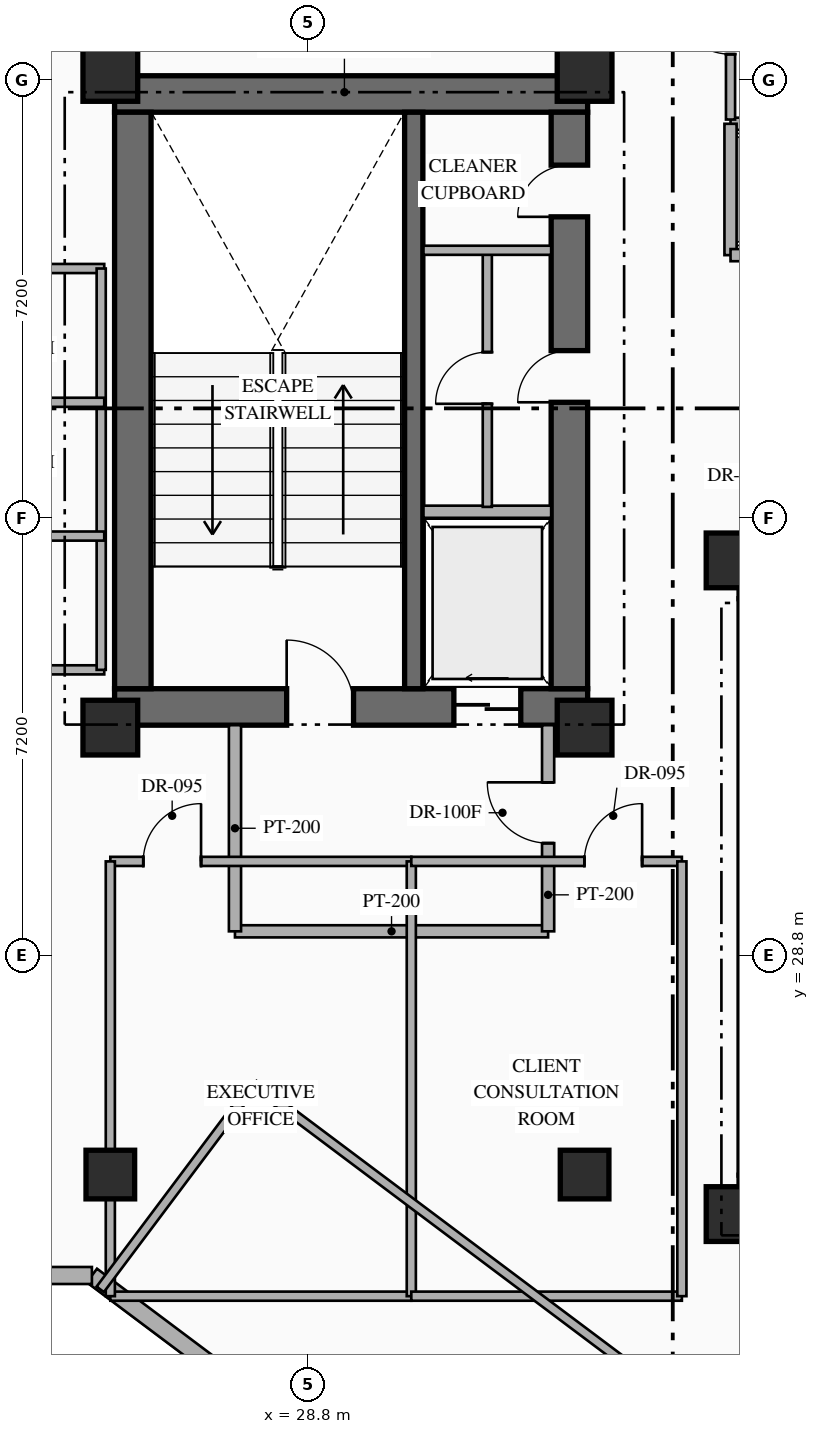
"""IFC4 building model, lengths in metres.
Left out: names, types, materials, properties, quantities, classifications, styles, units other than length and angle.
Written with IfcOpenShell. Run it as: python <this file> out.ifc"""

import sys

from ifc_helpers import new_model, si_unit, direction, frame, frame_2d, origin, origin_2d, place, context, subcontext, project, spatial, rectangle, hollow_rectangle, extrude, element, fill, save


model = new_model("IFC4")
c1 = context("Model", 3, precision=1e-05, world=origin(), true_north=direction((0.0, 1.0)))
c2 = subcontext(c1, "Body", "Model", "MODEL_VIEW")
j1 = project(units=[si_unit("LENGTHUNIT", "METRE"), si_unit("PLANEANGLEUNIT", "RADIAN")], contexts=[c1])
p1 = place(None, origin())
s1 = spatial("IfcSite", under=j1, at=p1, CompositionType="ELEMENT")
p2 = place(p1, origin())
s2 = spatial("IfcBuilding", under=s1, at=p2, CompositionType="ELEMENT")
p3 = place(p2, frame((0.0, 0.0, 163.65)))
s3 = spatial("IfcBuildingStorey", under=s2, at=p3, CompositionType="ELEMENT", Elevation=163.65)
p4 = place(p3, frame((25.62, 32.89, 0.0), z_axis=(0.0, 0.0, 1.0), x_axis=(1.0, 0.0, 0.0)))
e1 = element("IfcWall", 1, at=p4, inside=s3, PredefinedType="SHEAR", context=c2, shape_type="SweptSolid", body=[
    extrude(rectangle(XDim=7.78, YDim=0.6, at=frame_2d((3.89, 0.0))), origin(), (0.0, 0.0, 1.0), 3.6),
])
p5 = place(p4, frame((2.83, 0.0, 0.0)))
e2 = element("IfcOpeningElement", 2, at=p5, cuts=e1, PredefinedType="OPENING", context=c2, shape_type="SweptSolid", body=[
    extrude(rectangle(XDim=1.1, YDim=2.2, at=frame_2d((0.55, 1.1))), frame((0.0, 0.31, 0.0), z_axis=(0.0, -1.0, 0.0), x_axis=(1.0, 0.0, 0.0)), (0.0, 0.0, 1.0), 0.62),
])
p6 = place(p4, frame((5.58, 0.0, 0.0)))
e3 = element("IfcOpeningElement", 3, at=p6, cuts=e1, PredefinedType="OPENING", context=c2, shape_type="SweptSolid", body=[
    extrude(rectangle(XDim=1.1, YDim=2.15, at=frame_2d((0.55, 1.075))), frame((0.0, 0.31, 0.0), z_axis=(0.0, -1.0, 0.0), x_axis=(1.0, 0.0, 0.0)), (0.0, 0.0, 1.0), 0.62),
])
p7 = place(p3, frame((25.62, 42.97, 0.0), z_axis=(0.0, 0.0, 1.0), x_axis=(1.0, 0.0, 0.0)))
e4 = element("IfcWall", 4, at=p7, inside=s3, PredefinedType="SHEAR", context=c2, shape_type="SweptSolid", body=[
    extrude(rectangle(XDim=7.78, YDim=0.6, at=frame_2d((3.89, 0.0))), origin(), (0.0, 0.0, 1.0), 3.6),
])
p8 = place(p3, frame((25.92, 33.19, 0.0), z_axis=(0.0, 0.0, 1.0), x_axis=(0.0, 1.0, 0.0)))
e5 = element("IfcWall", 5, at=p8, inside=s3, PredefinedType="SHEAR", context=c2, shape_type="SweptSolid", body=[
    extrude(rectangle(XDim=9.48, YDim=0.6, at=frame_2d((4.74, 0.0))), origin(), (0.0, 0.0, 1.0), 3.6),
])
p9 = place(p3, frame((33.1, 33.19, 0.0), z_axis=(0.0, 0.0, 1.0), x_axis=(0.0, 1.0, 0.0)))
e6 = element("IfcWall", 6, at=p9, inside=s3, PredefinedType="SHEAR", context=c2, shape_type="SweptSolid", body=[
    extrude(rectangle(XDim=9.48, YDim=0.6, at=frame_2d((4.74, 0.0))), origin(), (0.0, 0.0, 1.0), 3.6),
])
p10 = place(p9, frame((4.71, 0.0, 0.0)))
e7 = element("IfcOpeningElement", 7, at=p10, cuts=e6, PredefinedType="OPENING", context=c2, shape_type="SweptSolid", body=[
    extrude(rectangle(XDim=0.85, YDim=2.08, at=frame_2d((0.425, 1.04))), frame((0.0, 0.31, 0.0), z_axis=(0.0, -1.0, 0.0), x_axis=(1.0, 0.0, 0.0)), (0.0, 0.0, 1.0), 0.62),
])
p11 = place(p9, frame((7.76, 0.0, 0.0)))
e8 = element("IfcOpeningElement", 8, at=p11, cuts=e6, PredefinedType="OPENING", context=c2, shape_type="SweptSolid", body=[
    extrude(rectangle(XDim=0.85, YDim=2.08, at=frame_2d((0.425, 1.04))), frame((0.0, 0.31, 0.0), z_axis=(0.0, -1.0, 0.0), x_axis=(1.0, 0.0, 0.0)), (0.0, 0.0, 1.0), 0.62),
])
p12 = place(p3, frame((30.54, 33.19, 0.0), z_axis=(0.0, 0.0, 1.0), x_axis=(0.0, 1.0, 0.0)))
e9 = element("IfcWall", 9, at=p12, inside=s3, PredefinedType="SHEAR", context=c2, shape_type="SweptSolid", body=[
    extrude(rectangle(XDim=9.48, YDim=0.3, at=frame_2d((4.74, 0.0))), origin(), (0.0, 0.0, 1.0), 3.6),
])
p13 = place(p3, frame((35.89, 24.89, 0.0), z_axis=(0.0, 0.0, 1.0), x_axis=(1.0, 0.0, 0.0)))
e10 = element("IfcWall", 10, at=p13, inside=s3, PredefinedType="SHEAR", context=c2, shape_type="SweptSolid", body=[
    extrude(rectangle(XDim=7.76, YDim=0.6, at=frame_2d((3.88, 0.0))), origin(), (0.0, 0.0, 1.0), 3.6),
])
p14 = place(p3, frame((35.89, 34.97, 0.0), z_axis=(0.0, 0.0, 1.0), x_axis=(1.0, 0.0, 0.0)))
e11 = element("IfcWall", 11, at=p14, inside=s3, PredefinedType="SHEAR", context=c2, shape_type="SweptSolid", body=[
    extrude(rectangle(XDim=7.76, YDim=0.6, at=frame_2d((3.88, 0.0))), origin(), (0.0, 0.0, 1.0), 3.6),
])
p15 = place(p14, frame((2.66, 0.0, 0.0)))
e12 = element("IfcOpeningElement", 12, at=p15, cuts=e11, PredefinedType="OPENING", context=c2, shape_type="SweptSolid", body=[
    extrude(rectangle(XDim=1.1, YDim=2.2, at=frame_2d((0.55, 1.1))), frame((0.0, 0.31, 0.0), z_axis=(0.0, -1.0, 0.0), x_axis=(1.0, 0.0, 0.0)), (0.0, 0.0, 1.0), 0.62),
])
p16 = place(p14, frame((5.56, 0.0, 0.0)))
e13 = element("IfcOpeningElement", 13, at=p16, cuts=e11, PredefinedType="OPENING", context=c2, shape_type="SweptSolid", body=[
    extrude(rectangle(XDim=1.12, YDim=2.15, at=frame_2d((0.56, 1.075))), frame((0.0, 0.31, 0.0), z_axis=(0.0, -1.0, 0.0), x_axis=(1.0, 0.0, 0.0)), (0.0, 0.0, 1.0), 0.62),
])
p17 = place(p3, frame((36.19, 25.19, 0.0), z_axis=(0.0, 0.0, 1.0), x_axis=(0.0, 1.0, 0.0)))
e14 = element("IfcWall", 14, at=p17, inside=s3, PredefinedType="SHEAR", context=c2, shape_type="SweptSolid", body=[
    extrude(rectangle(XDim=9.48, YDim=0.6, at=frame_2d((4.74, 0.0))), origin(), (0.0, 0.0, 1.0), 3.6),
])
for number, where, z_axis, x_axis in (
    (15, (25.55, 32.55, 0.0), (0.0, 0.0, 1.0), (1.0, 0.0, 0.0)),
    (16, (33.35, 32.55, 0.0), (0.0, 0.0, 1.0), (1.0, 0.0, 0.0)),
    (17, (25.55, 43.3, 0.0), (0.0, 0.0, 1.0), (1.0, 0.0, 0.0)),
    (18, (33.35, 43.3, 0.0), (0.0, 0.0, 1.0), (1.0, 0.0, 0.0)),
    (19, (35.8, 24.55, 0.0), (0.0, 0.0, 1.0), (1.0, 0.0, 0.0)),
    (20, (35.8, 35.3, 0.0), (0.0, 0.0, 1.0), (1.0, 0.0, 0.0)),
):
    element("IfcColumn", number, at=place(p3, frame(where, z_axis=z_axis, x_axis=x_axis)), inside=s3, PredefinedType="COLUMN", context=c2, shape_type="SweptSolid", body=[
        extrude(rectangle(XDim=0.9, YDim=0.9, at=origin_2d()), origin(), (0.0, 0.0, 1.0), 3.6),
    ])
for number, where, z_axis, x_axis in (
    (21, (25.55, 25.2, 0.0), (0.0, 0.0, 1.0), (1.0, 0.0, 0.0)),
    (22, (33.35, 25.2, 0.0), (0.0, 0.0, 1.0), (1.0, 0.0, 0.0)),
):
    element("IfcColumn", number, at=place(p3, frame(where, z_axis=z_axis, x_axis=x_axis)), inside=s3, PredefinedType="COLUMN", context=c2, shape_type="SweptSolid", body=[
        extrude(hollow_rectangle(XDim=0.8, YDim=0.8, WallThickness=0.032, at=origin_2d()), origin(), (0.0, 0.0, 1.0), 3.6),
    ])
p18 = place(p3, frame((44.918, 8.787, 0.0), z_axis=(0.0, 0.0, 1.0), x_axis=(-0.800004765927, 0.599993645378, 0.0)))
e23 = element("IfcWall", 23, at=p18, inside=s3, PredefinedType="STANDARD", context=c2, shape_type="SweptSolid", body=[
    extrude(rectangle(XDim=24.588, YDim=0.28, at=frame_2d((12.294, 0.0))), origin(), (0.0, 0.0, 1.0), 3.35),
])
p19 = place(p3, frame((25.247, 23.54, 0.0), z_axis=(0.0, 0.0, 1.0), x_axis=(-1.0, 0.0, 0.0)))
e24 = element("IfcWall", 24, at=p19, inside=s3, PredefinedType="STANDARD", context=c2, shape_type="SweptSolid", body=[
    extrude(rectangle(XDim=6.747, YDim=0.28, at=frame_2d((3.374, 0.0))), origin(), (0.0, 0.0, 1.0), 3.35),
])
p20 = place(p3, frame((30.7, 36.1, 0.0), z_axis=(0.0, 0.0, 1.0), x_axis=(1.0, 0.0, 0.0)))
e25 = element("IfcWall", 25, at=p20, inside=s3, PredefinedType="STANDARD", context=c2, shape_type="SweptSolid", body=[
    extrude(rectangle(XDim=2.1, YDim=0.2, at=frame_2d((1.05, 0.0))), origin(), (0.0, 0.0, 1.0), 3.35),
])
p21 = place(p3, frame((31.75, 36.18, 0.0), z_axis=(0.0, 0.0, 1.0), x_axis=(0.0, 1.0, 0.0)))
e26 = element("IfcWall", 26, at=p21, inside=s3, PredefinedType="PARTITIONING", context=c2, shape_type="SweptSolid", body=[
    extrude(rectangle(XDim=4.24, YDim=0.15, at=frame_2d((2.12, 0.0))), origin(), (0.0, 0.0, 1.0), 3.35),
])
p22 = place(p21, frame((1.695, 0.0, 0.0)))
e27 = element("IfcOpeningElement", 27, at=p22, cuts=e26, PredefinedType="OPENING", context=c2, shape_type="SweptSolid", body=[
    extrude(rectangle(XDim=0.85, YDim=2.08, at=frame_2d((0.425, 1.04))), frame((0.0, 0.085, 0.0), z_axis=(0.0, -1.0, 0.0), x_axis=(1.0, 0.0, 0.0)), (0.0, 0.0, 1.0), 0.17),
])
p23 = place(p3, frame((30.7, 40.4, 0.0), z_axis=(0.0, 0.0, 1.0), x_axis=(1.0, 0.0, 0.0)))
e28 = element("IfcWall", 28, at=p23, inside=s3, PredefinedType="PARTITIONING", context=c2, shape_type="SweptSolid", body=[
    extrude(rectangle(XDim=2.1, YDim=0.15, at=frame_2d((1.05, 0.0))), origin(), (0.0, 0.0, 1.0), 3.35),
])
p24 = place(p3, frame((27.6, 29.2, 0.0), z_axis=(0.0, 0.0, 1.0), x_axis=(1.0, 0.0, 0.0)))
e29 = element("IfcWall", 29, at=p24, inside=s3, PredefinedType="STANDARD", context=c2, shape_type="SweptSolid", body=[
    extrude(rectangle(XDim=5.15, YDim=0.2, at=frame_2d((2.575, 0.0))), origin(), (0.0, 0.0, 1.0), 3.35),
])
p25 = place(p3, frame((27.6, 29.2, 0.0), z_axis=(0.0, 0.0, 1.0), x_axis=(0.0, 1.0, 0.0)))
e30 = element("IfcWall", 30, at=p25, inside=s3, PredefinedType="STANDARD", context=c2, shape_type="SweptSolid", body=[
    extrude(rectangle(XDim=3.39, YDim=0.2, at=frame_2d((1.695, 0.0))), origin(), (0.0, 0.0, 1.0), 3.35),
])
p26 = place(p3, frame((32.75, 29.2, 0.0), z_axis=(0.0, 0.0, 1.0), x_axis=(0.0, 1.0, 0.0)))
e31 = element("IfcWall", 31, at=p26, inside=s3, PredefinedType="STANDARD", context=c2, shape_type="SweptSolid", body=[
    extrude(rectangle(XDim=3.39, YDim=0.2, at=frame_2d((1.695, 0.0))), origin(), (0.0, 0.0, 1.0), 3.35),
])
p27 = place(p26, frame((1.45, 0.0, 0.0)))
e32 = element("IfcOpeningElement", 32, at=p27, cuts=e31, PredefinedType="OPENING", context=c2, shape_type="SweptSolid", body=[
    extrude(rectangle(XDim=1.0, YDim=2.2, at=frame_2d((0.5, 1.1))), frame((0.0, 0.11, 0.0), z_axis=(0.0, -1.0, 0.0), x_axis=(1.0, 0.0, 0.0)), (0.0, 0.0, 1.0), 0.22),
])
p28 = place(p3, frame((35.75, 42.48, 0.0), z_axis=(0.0, 0.0, 1.0), x_axis=(1.0, 0.0, 0.0)))
e33 = element("IfcWall", 33, at=p28, inside=s3, PredefinedType="STANDARD", context=c2, shape_type="SweptSolid", body=[
    extrude(rectangle(XDim=9.11, YDim=0.2, at=frame_2d((4.555, 0.0))), origin(), (0.0, 0.0, 1.0), 3.35),
])
p29 = place(p3, frame((35.75, 40.32, 0.0), z_axis=(0.0, 0.0, 1.0), x_axis=(0.0, 1.0, 0.0)))
e34 = element("IfcWall", 34, at=p29, inside=s3, PredefinedType="STANDARD", context=c2, shape_type="SweptSolid", body=[
    extrude(rectangle(XDim=2.16, YDim=0.2, at=frame_2d((1.08, 0.0))), origin(), (0.0, 0.0, 1.0), 3.35),
])
p30 = place(p3, frame((35.75, 40.32, 0.0), z_axis=(0.0, 0.0, 1.0), x_axis=(1.0, 0.0, 0.0)))
e35 = element("IfcWall", 35, at=p30, inside=s3, PredefinedType="STANDARD", context=c2, shape_type="SweptSolid", body=[
    extrude(rectangle(XDim=9.11, YDim=0.2, at=frame_2d((4.555, 0.0))), origin(), (0.0, 0.0, 1.0), 3.35),
])
p31 = place(p30, frame((0.53, 0.0, 0.0)))
e36 = element("IfcOpeningElement", 36, at=p31, cuts=e35, PredefinedType="OPENING", context=c2, shape_type="SweptSolid", body=[
    extrude(rectangle(XDim=1.1, YDim=2.18, at=frame_2d((0.55, 1.09))), frame((0.0, 0.11, 0.0), z_axis=(0.0, -1.0, 0.0), x_axis=(1.0, 0.0, 0.0)), (0.0, 0.0, 1.0), 0.22),
])
p32 = place(p30, frame((2.73, 0.0, 0.0)))
e37 = element("IfcOpeningElement", 37, at=p32, cuts=e35, PredefinedType="OPENING", context=c2, shape_type="SweptSolid", body=[
    extrude(rectangle(XDim=1.1, YDim=2.18, at=frame_2d((0.55, 1.09))), frame((0.0, 0.11, 0.0), z_axis=(0.0, -1.0, 0.0), x_axis=(1.0, 0.0, 0.0)), (0.0, 0.0, 1.0), 0.22),
])
p33 = place(p30, frame((4.93, 0.0, 0.0)))
e38 = element("IfcOpeningElement", 38, at=p33, cuts=e35, PredefinedType="OPENING", context=c2, shape_type="SweptSolid", body=[
    extrude(rectangle(XDim=1.1, YDim=2.18, at=frame_2d((0.55, 1.09))), frame((0.0, 0.11, 0.0), z_axis=(0.0, -1.0, 0.0), x_axis=(1.0, 0.0, 0.0)), (0.0, 0.0, 1.0), 0.22),
])
p34 = place(p30, frame((7.13, 0.0, 0.0)))
e39 = element("IfcOpeningElement", 39, at=p34, cuts=e35, PredefinedType="OPENING", context=c2, shape_type="SweptSolid", body=[
    extrude(rectangle(XDim=1.1, YDim=2.18, at=frame_2d((0.55, 1.09))), frame((0.0, 0.11, 0.0), z_axis=(0.0, -1.0, 0.0), x_axis=(1.0, 0.0, 0.0)), (0.0, 0.0, 1.0), 0.22),
])
for number, where, z_axis, x_axis in (
    (40, (22.15, 33.5, 0.0), (0.0, 0.0, 1.0), (1.0, 0.0, 0.0)),
    (41, (22.15, 40.1, 0.0), (0.0, 0.0, 1.0), (1.0, 0.0, 0.0)),
):
    element("IfcWall", number, at=place(p3, frame(where, z_axis=z_axis, x_axis=x_axis)), inside=s3, PredefinedType="PARTITIONING", context=c2, shape_type="SweptSolid", body=[
        extrude(rectangle(XDim=3.3, YDim=0.15, at=frame_2d((1.65, 0.0))), origin(), (0.0, 0.0, 1.0), 3.35),
    ])
p35 = place(p3, frame((25.4, 33.5, 0.0), z_axis=(0.0, 0.0, 1.0), x_axis=(0.0, 1.0, 0.0)))
e42 = element("IfcWall", 42, at=p35, inside=s3, PredefinedType="PARTITIONING", context=c2, shape_type="SweptSolid", body=[
    extrude(rectangle(XDim=6.6, YDim=0.15, at=frame_2d((3.3, 0.0))), origin(), (0.0, 0.0, 1.0), 3.35),
])
for number, where, z_axis, x_axis in (
    (43, (22.15, 35.7, 0.0), (0.0, 0.0, 1.0), (1.0, 0.0, 0.0)),
    (44, (22.15, 37.9, 0.0), (0.0, 0.0, 1.0), (1.0, 0.0, 0.0)),
):
    element("IfcWall", number, at=place(p3, frame(where, z_axis=z_axis, x_axis=x_axis)), inside=s3, PredefinedType="PARTITIONING", context=c2, shape_type="SweptSolid", body=[
        extrude(rectangle(XDim=3.3, YDim=0.15, at=frame_2d((1.65, 0.0))), origin(), (0.0, 0.0, 1.0), 3.35),
    ])
p36 = place(p3, frame((25.55, 23.2, 0.0), z_axis=(0.0, 0.0, 1.0), x_axis=(1.0, 0.0, 0.0)))
e45 = element("IfcWall", 45, at=p36, inside=s3, PredefinedType="PARTITIONING", context=c2, shape_type="SweptSolid", body=[
    extrude(rectangle(XDim=4.95, YDim=0.15, at=frame_2d((2.475, 0.0))), origin(), (0.0, 0.0, 1.0), 3.35),
])
p37 = place(p3, frame((25.55, 30.35, 0.0), z_axis=(0.0, 0.0, 1.0), x_axis=(1.0, 0.0, 0.0)))
e46 = element("IfcWall", 46, at=p37, inside=s3, PredefinedType="PARTITIONING", context=c2, shape_type="SweptSolid", body=[
    extrude(rectangle(XDim=4.95, YDim=0.15, at=frame_2d((2.475, 0.0))), origin(), (0.0, 0.0, 1.0), 3.35),
])
p38 = place(p37, frame((0.542, 0.0, 0.0)))
e47 = element("IfcOpeningElement", 47, at=p38, cuts=e46, PredefinedType="OPENING", context=c2, shape_type="SweptSolid", body=[
    extrude(rectangle(XDim=0.95, YDim=2.15, at=frame_2d((0.475, 1.075))), frame((0.0, 0.085, 0.0), z_axis=(0.0, -1.0, 0.0), x_axis=(1.0, 0.0, 0.0)), (0.0, 0.0, 1.0), 0.17),
])
p39 = place(p3, frame((25.55, 23.2, 0.0), z_axis=(0.0, 0.0, 1.0), x_axis=(0.0, 1.0, 0.0)))
e48 = element("IfcWall", 48, at=p39, inside=s3, PredefinedType="PARTITIONING", context=c2, shape_type="SweptSolid", body=[
    extrude(rectangle(XDim=7.15, YDim=0.15, at=frame_2d((3.575, 0.0))), origin(), (0.0, 0.0, 1.0), 2.695),
])
p40 = place(p3, frame((30.5, 23.2, 0.0), z_axis=(0.0, 0.0, 1.0), x_axis=(0.0, 1.0, 0.0)))
e49 = element("IfcWall", 49, at=p40, inside=s3, PredefinedType="PARTITIONING", context=c2, shape_type="SweptSolid", body=[
    extrude(rectangle(XDim=7.15, YDim=0.15, at=frame_2d((3.575, 0.0))), origin(), (0.0, 0.0, 1.0), 3.35),
])
p41 = place(p3, frame((30.5, 23.2, 0.0), z_axis=(0.0, 0.0, 1.0), x_axis=(1.0, 0.0, 0.0)))
e50 = element("IfcWall", 50, at=p41, inside=s3, PredefinedType="PARTITIONING", context=c2, shape_type="SweptSolid", body=[
    extrude(rectangle(XDim=4.45, YDim=0.15, at=frame_2d((2.225, 0.0))), origin(), (0.0, 0.0, 1.0), 3.35),
])
p42 = place(p3, frame((30.5, 30.35, 0.0), z_axis=(0.0, 0.0, 1.0), x_axis=(1.0, 0.0, 0.0)))
e51 = element("IfcWall", 51, at=p42, inside=s3, PredefinedType="PARTITIONING", context=c2, shape_type="SweptSolid", body=[
    extrude(rectangle(XDim=4.45, YDim=0.15, at=frame_2d((2.225, 0.0))), origin(), (0.0, 0.0, 1.0), 3.35),
])
p43 = place(p42, frame((2.846, 0.0, 0.0)))
e52 = element("IfcOpeningElement", 52, at=p43, cuts=e51, PredefinedType="OPENING", context=c2, shape_type="SweptSolid", body=[
    extrude(rectangle(XDim=0.95, YDim=2.15, at=frame_2d((0.475, 1.075))), frame((0.0, 0.085, 0.0), z_axis=(0.0, -1.0, 0.0), x_axis=(1.0, 0.0, 0.0)), (0.0, 0.0, 1.0), 0.17),
])
p44 = place(p3, frame((34.95, 23.2, 0.0), z_axis=(0.0, 0.0, 1.0), x_axis=(0.0, 1.0, 0.0)))
e53 = element("IfcWall", 53, at=p44, inside=s3, PredefinedType="PARTITIONING", context=c2, shape_type="SweptSolid", body=[
    extrude(rectangle(XDim=7.15, YDim=0.15, at=frame_2d((3.575, 0.0))), origin(), (0.0, 0.0, 1.0), 3.35),
])
p45 = place(p3, frame((35.75, 42.55, 0.0), z_axis=(0.0, 0.0, 1.0), x_axis=(0.0, 1.0, 0.0)))
e54 = element("IfcWall", 54, at=p45, inside=s3, PredefinedType="PARTITIONING", context=c2, shape_type="SweptSolid", body=[
    extrude(rectangle(XDim=3.1, YDim=0.15, at=frame_2d((1.55, 0.0))), origin(), (0.0, 0.0, 1.0), 3.35),
])
p46 = place(p45, frame((1.075, 0.0, 0.0)))
e55 = element("IfcOpeningElement", 55, at=p46, cuts=e54, PredefinedType="OPENING", context=c2, shape_type="SweptSolid", body=[
    extrude(rectangle(XDim=0.95, YDim=2.15, at=frame_2d((0.475, 1.075))), frame((0.0, 0.085, 0.0), z_axis=(0.0, -1.0, 0.0), x_axis=(1.0, 0.0, 0.0)), (0.0, 0.0, 1.0), 0.17),
])
p47 = place(p3, frame((27.91, 26.68, 0.0), z_axis=(0.0, 0.0, 1.0), x_axis=(0.800005938517, -0.599992081896, 0.0)))
e56 = element("IfcWall", 56, at=p47, inside=s3, PredefinedType="PARTITIONING", context=c2, shape_type="SweptSolid", body=[
    extrude(rectangle(XDim=14.8, YDim=0.15, at=frame_2d((7.4, 0.0))), origin(), (0.0, 0.0, 1.0), 3.35),
])
p48 = place(p47, frame((9.281, 0.0, 0.0)))
e57 = element("IfcOpeningElement", 57, at=p48, cuts=e56, PredefinedType="OPENING", context=c2, shape_type="SweptSolid", body=[
    extrude(rectangle(XDim=0.95, YDim=2.15, at=frame_2d((0.475, 1.075))), frame((0.0, 0.085, 0.0), z_axis=(0.0, -1.0, 0.0), x_axis=(1.0, 0.0, 0.0)), (0.0, 0.0, 1.0), 0.17),
])
p49 = place(p3, frame((25.384, 23.312, 0.0), z_axis=(0.0, 0.0, 1.0), x_axis=(0.599990721155, 0.80000695905, 0.0)))
e58 = element("IfcWall", 58, at=p49, inside=s3, PredefinedType="PARTITIONING", context=c2, shape_type="SweptSolid", body=[
    extrude(rectangle(XDim=4.21, YDim=0.15, at=frame_2d((2.105, 0.0))), origin(), (0.0, 0.0, 1.0), 3.35),
])
p50 = place(p5, origin())
e59 = element("IfcDoor", 59, at=p50, inside=s3, OperationType="SINGLE_SWING_LEFT", PredefinedType="DOOR", context=c2, shape_type="SweptSolid", body=[
    extrude(rectangle(XDim=1.1, YDim=2.2, at=frame_2d((0.55, 1.1))), frame((0.0, 0.025, 0.0), z_axis=(0.0, -1.0, 0.0), x_axis=(1.0, 0.0, 0.0)), (0.0, 0.0, 1.0), 0.05),
])
fill(e2, e59)
p51 = place(p6, origin())
e60 = element("IfcDoor", 60, at=p51, inside=s3, OperationType="SLIDING_TO_LEFT", PredefinedType="USERDEFINED", context=c2, shape_type="SweptSolid", body=[
    extrude(rectangle(XDim=1.1, YDim=2.15, at=frame_2d((0.55, 1.075))), frame((0.0, 0.025, 0.0), z_axis=(0.0, -1.0, 0.0), x_axis=(1.0, 0.0, 0.0)), (0.0, 0.0, 1.0), 0.05),
])
fill(e3, e60)
p52 = place(p10, origin())
e61 = element("IfcDoor", 61, at=p52, inside=s3, OperationType="SINGLE_SWING_LEFT", PredefinedType="DOOR", context=c2, shape_type="SweptSolid", body=[
    extrude(rectangle(XDim=0.85, YDim=2.08, at=frame_2d((0.425, 1.04))), frame((0.0, 0.025, 0.0), z_axis=(0.0, -1.0, 0.0), x_axis=(1.0, 0.0, 0.0)), (0.0, 0.0, 1.0), 0.05),
])
fill(e7, e61)
p53 = place(p11, origin())
e62 = element("IfcDoor", 62, at=p53, inside=s3, OperationType="SINGLE_SWING_LEFT", PredefinedType="DOOR", context=c2, shape_type="SweptSolid", body=[
    extrude(rectangle(XDim=0.85, YDim=2.08, at=frame_2d((0.425, 1.04))), frame((0.0, 0.025, 0.0), z_axis=(0.0, -1.0, 0.0), x_axis=(1.0, 0.0, 0.0)), (0.0, 0.0, 1.0), 0.05),
])
fill(e8, e62)
p54 = place(p22, origin())
e63 = element("IfcDoor", 63, at=p54, inside=s3, OperationType="SINGLE_SWING_LEFT", PredefinedType="DOOR", context=c2, shape_type="SweptSolid", body=[
    extrude(rectangle(XDim=0.85, YDim=2.08, at=frame_2d((0.425, 1.04))), frame((0.0, 0.025, 0.0), z_axis=(0.0, -1.0, 0.0), x_axis=(1.0, 0.0, 0.0)), (0.0, 0.0, 1.0), 0.05),
])
fill(e27, e63)
p55 = place(p27, origin())
e64 = element("IfcDoor", 64, at=p55, inside=s3, OperationType="SINGLE_SWING_RIGHT", PredefinedType="DOOR", context=c2, shape_type="SweptSolid", body=[
    extrude(rectangle(XDim=1.0, YDim=2.2, at=frame_2d((0.5, 1.1))), frame((0.0, 0.025, 0.0), z_axis=(0.0, -1.0, 0.0), x_axis=(1.0, 0.0, 0.0)), (0.0, 0.0, 1.0), 0.05),
])
fill(e32, e64)
p56 = place(p38, origin())
e65 = element("IfcDoor", 65, at=p56, inside=s3, OperationType="SINGLE_SWING_RIGHT", PredefinedType="DOOR", context=c2, shape_type="SweptSolid", body=[
    extrude(rectangle(XDim=0.95, YDim=2.15, at=frame_2d((0.475, 1.075))), frame((0.0, 0.025, 0.0), z_axis=(0.0, -1.0, 0.0), x_axis=(1.0, 0.0, 0.0)), (0.0, 0.0, 1.0), 0.05),
])
fill(e47, e65)
p57 = place(p43, origin())
e66 = element("IfcDoor", 66, at=p57, inside=s3, OperationType="SINGLE_SWING_RIGHT", PredefinedType="DOOR", context=c2, shape_type="SweptSolid", body=[
    extrude(rectangle(XDim=0.95, YDim=2.15, at=frame_2d((0.475, 1.075))), frame((0.0, 0.025, 0.0), z_axis=(0.0, -1.0, 0.0), x_axis=(1.0, 0.0, 0.0)), (0.0, 0.0, 1.0), 0.05),
])
fill(e52, e66)
p58 = place(p46, origin())
e67 = element("IfcDoor", 67, at=p58, inside=s3, OperationType="SINGLE_SWING_RIGHT", PredefinedType="DOOR", context=c2, shape_type="SweptSolid", body=[
    extrude(rectangle(XDim=0.95, YDim=2.15, at=frame_2d((0.475, 1.075))), frame((0.0, 0.025, 0.0), z_axis=(0.0, -1.0, 0.0), x_axis=(1.0, 0.0, 0.0)), (0.0, 0.0, 1.0), 0.05),
])
fill(e55, e67)
save(model, sys.argv[1])
